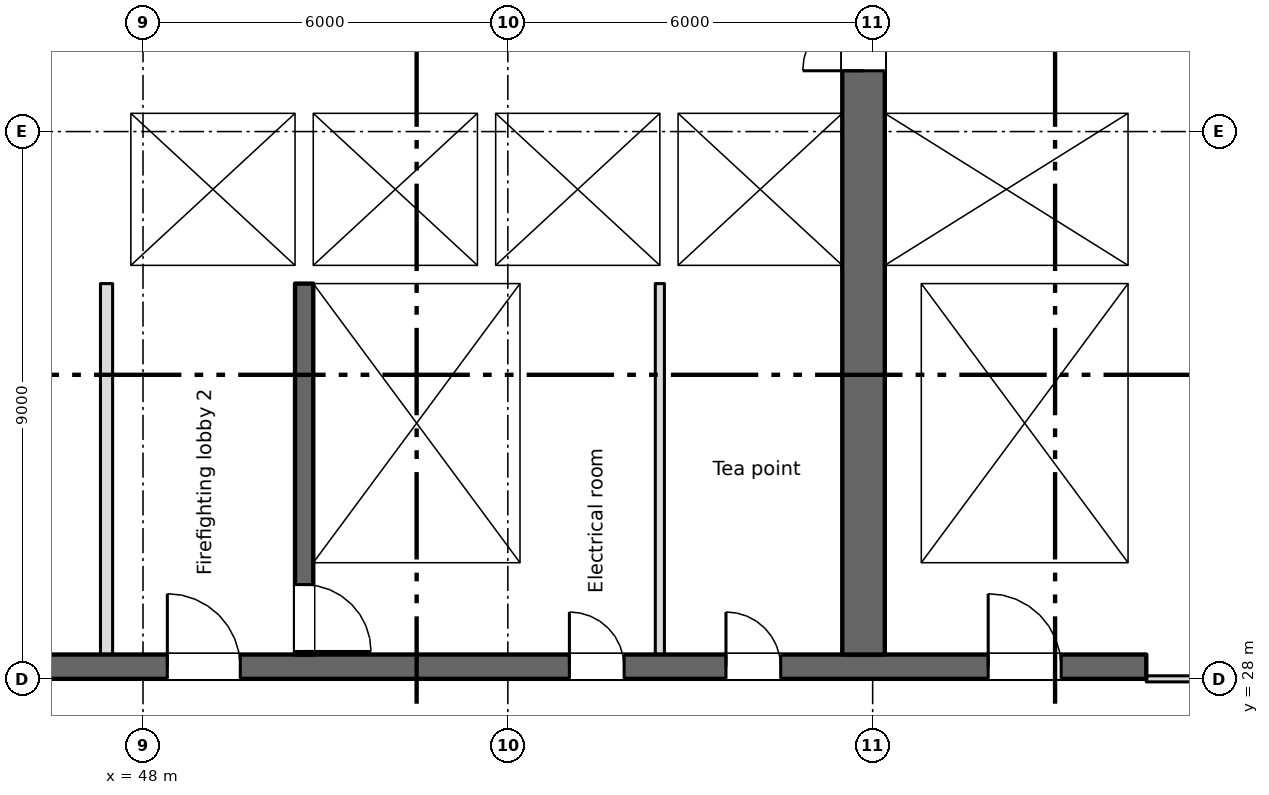
"""IFC4 building model, lengths in metres.
Left out: names, types, materials, properties, quantities, classifications, styles, units other than length and angle.
Written with IfcOpenShell. Run it as: python <this file> out.ifc"""

import sys

from ifc_helpers import new_model, si_unit, direction, frame, frame_2d, origin, place, context, subcontext, project, spatial, rectangle, extrude, element, fill, save


model = new_model("IFC4")
c1 = context("Model", 3, precision=1e-05, world=origin(), true_north=direction((0.0, 1.0)))
c2 = subcontext(c1, "Body", "Model", "MODEL_VIEW")
j1 = project(units=[si_unit("LENGTHUNIT", "METRE"), si_unit("PLANEANGLEUNIT", "RADIAN")], contexts=[c1])
p1 = place(None, origin())
s1 = spatial("IfcSite", under=j1, at=p1, CompositionType="ELEMENT")
p2 = place(p1, origin())
s2 = spatial("IfcBuilding", under=s1, at=p2, CompositionType="ELEMENT")
p3 = place(p2, frame((0.0, 0.0, 189.25)))
s3 = spatial("IfcBuildingStorey", under=s2, at=p3, CompositionType="ELEMENT", Elevation=189.25)
p4 = place(p3, frame((6.6, 28.2, 0.0), z_axis=(0.0, 0.0, 1.0), x_axis=(1.0, 0.0, 0.0)))
e1 = element("IfcWall", 1, at=p4, inside=s3, PredefinedType="SHEAR", context=c2, shape_type="SweptSolid", body=[
    extrude(rectangle(XDim=57.9, YDim=0.4, at=frame_2d((28.95, 0.0))), origin(), (0.0, 0.0, 1.0), 3.35),
])
p5 = place(p4, frame((12.913, 0.0, 0.0)))
e2 = element("IfcOpeningElement", 2, at=p5, cuts=e1, PredefinedType="OPENING", context=c2, shape_type="SweptSolid", body=[
    extrude(rectangle(XDim=0.9, YDim=2.1, at=frame_2d((0.45, 1.05))), frame((0.0, 0.21, 0.0), z_axis=(0.0, -1.0, 0.0), x_axis=(1.0, 0.0, 0.0)), (0.0, 0.0, 1.0), 0.42),
])
p6 = place(p4, frame((15.488, 0.0, 0.0)))
e3 = element("IfcOpeningElement", 3, at=p6, cuts=e1, PredefinedType="OPENING", context=c2, shape_type="SweptSolid", body=[
    extrude(rectangle(XDim=0.9, YDim=2.1, at=frame_2d((0.45, 1.05))), frame((0.0, 0.21, 0.0), z_axis=(0.0, -1.0, 0.0), x_axis=(1.0, 0.0, 0.0)), (0.0, 0.0, 1.0), 0.42),
])
p7 = place(p4, frame((48.413, 0.0, 0.0)))
e4 = element("IfcOpeningElement", 4, at=p7, cuts=e1, PredefinedType="OPENING", context=c2, shape_type="SweptSolid", body=[
    extrude(rectangle(XDim=0.9, YDim=2.1, at=frame_2d((0.45, 1.05))), frame((0.0, 0.21, 0.0), z_axis=(0.0, -1.0, 0.0), x_axis=(1.0, 0.0, 0.0)), (0.0, 0.0, 1.0), 0.42),
])
p8 = place(p4, frame((50.988, 0.0, 0.0)))
e5 = element("IfcOpeningElement", 5, at=p8, cuts=e1, PredefinedType="OPENING", context=c2, shape_type="SweptSolid", body=[
    extrude(rectangle(XDim=0.9, YDim=2.1, at=frame_2d((0.45, 1.05))), frame((0.0, 0.21, 0.0), z_axis=(0.0, -1.0, 0.0), x_axis=(1.0, 0.0, 0.0)), (0.0, 0.0, 1.0), 0.42),
])
p9 = place(p4, frame((0.663, 0.0, 0.0)))
e6 = element("IfcOpeningElement", 6, at=p9, cuts=e1, PredefinedType="OPENING", context=c2, shape_type="SweptSolid", body=[
    extrude(rectangle(XDim=0.9, YDim=2.1, at=frame_2d((0.45, 1.05))), frame((0.0, 0.21, 0.0), z_axis=(0.0, -1.0, 0.0), x_axis=(1.0, 0.0, 0.0)), (0.0, 0.0, 1.0), 0.42),
])
p10 = place(p4, frame((2.238, 0.0, 0.0)))
e7 = element("IfcOpeningElement", 7, at=p10, cuts=e1, PredefinedType="OPENING", context=c2, shape_type="SweptSolid", body=[
    extrude(rectangle(XDim=0.9, YDim=2.1, at=frame_2d((0.45, 1.05))), frame((0.0, 0.21, 0.0), z_axis=(0.0, -1.0, 0.0), x_axis=(1.0, 0.0, 0.0)), (0.0, 0.0, 1.0), 0.42),
])
p11 = place(p4, frame((4.8, 0.0, 0.0)))
e8 = element("IfcOpeningElement", 8, at=p11, cuts=e1, PredefinedType="OPENING", context=c2, shape_type="SweptSolid", body=[
    extrude(rectangle(XDim=1.2, YDim=2.1, at=frame_2d((0.6, 1.05))), frame((0.0, 0.21, 0.0), z_axis=(0.0, -1.0, 0.0), x_axis=(1.0, 0.0, 0.0)), (0.0, 0.0, 1.0), 0.42),
])
p12 = place(p4, frame((31.8, 0.0, 0.0)))
e9 = element("IfcOpeningElement", 9, at=p12, cuts=e1, PredefinedType="OPENING", context=c2, shape_type="SweptSolid", body=[
    extrude(rectangle(XDim=1.2, YDim=2.1, at=frame_2d((0.6, 1.05))), frame((0.0, 0.21, 0.0), z_axis=(0.0, -1.0, 0.0), x_axis=(1.0, 0.0, 0.0)), (0.0, 0.0, 1.0), 0.42),
])
p13 = place(p4, frame((55.3, 0.0, 0.0)))
e10 = element("IfcOpeningElement", 10, at=p13, cuts=e1, PredefinedType="OPENING", context=c2, shape_type="SweptSolid", body=[
    extrude(rectangle(XDim=1.2, YDim=2.1, at=frame_2d((0.6, 1.05))), frame((0.0, 0.21, 0.0), z_axis=(0.0, -1.0, 0.0), x_axis=(1.0, 0.0, 0.0)), (0.0, 0.0, 1.0), 0.42),
])
p14 = place(p4, frame((21.8, 0.0, 0.0)))
e11 = element("IfcOpeningElement", 11, at=p14, cuts=e1, PredefinedType="OPENING", context=c2, shape_type="SweptSolid", body=[
    extrude(rectangle(XDim=1.2, YDim=2.1, at=frame_2d((0.6, 1.05))), frame((0.0, 0.21, 0.0), z_axis=(0.0, -1.0, 0.0), x_axis=(1.0, 0.0, 0.0)), (0.0, 0.0, 1.0), 0.42),
])
p15 = place(p4, frame((41.8, 0.0, 0.0)))
e12 = element("IfcOpeningElement", 12, at=p15, cuts=e1, PredefinedType="OPENING", context=c2, shape_type="SweptSolid", body=[
    extrude(rectangle(XDim=1.2, YDim=2.1, at=frame_2d((0.6, 1.05))), frame((0.0, 0.21, 0.0), z_axis=(0.0, -1.0, 0.0), x_axis=(1.0, 0.0, 0.0)), (0.0, 0.0, 1.0), 0.42),
])
p16 = place(p4, frame((24.95, 0.0, 0.0)))
e13 = element("IfcOpeningElement", 13, at=p16, cuts=e1, PredefinedType="OPENING", context=c2, shape_type="SweptSolid", body=[
    extrude(rectangle(XDim=2.4, YDim=2.1, at=frame_2d((1.2, 1.05))), frame((0.0, 0.21, 0.0), z_axis=(0.0, -1.0, 0.0), x_axis=(1.0, 0.0, 0.0)), (0.0, 0.0, 1.0), 0.42),
])
p17 = place(p4, frame((37.45, 0.0, 0.0)))
e14 = element("IfcOpeningElement", 14, at=p17, cuts=e1, PredefinedType="OPENING", context=c2, shape_type="SweptSolid", body=[
    extrude(rectangle(XDim=2.4, YDim=2.1, at=frame_2d((1.2, 1.05))), frame((0.0, 0.21, 0.0), z_axis=(0.0, -1.0, 0.0), x_axis=(1.0, 0.0, 0.0)), (0.0, 0.0, 1.0), 0.42),
])
p18 = place(p4, frame((8.1, 0.0, 0.0)))
e15 = element("IfcOpeningElement", 15, at=p18, cuts=e1, PredefinedType="OPENING", context=c2, shape_type="SweptSolid", body=[
    extrude(rectangle(XDim=2.4, YDim=2.1, at=frame_2d((1.2, 1.05))), frame((0.0, 0.21, 0.0), z_axis=(0.0, -1.0, 0.0), x_axis=(1.0, 0.0, 0.0)), (0.0, 0.0, 1.0), 0.42),
])
p19 = place(p4, frame((28.95, 0.0, 0.0)))
e16 = element("IfcOpeningElement", 16, at=p19, cuts=e1, PredefinedType="OPENING", context=c2, shape_type="SweptSolid", body=[
    extrude(rectangle(XDim=0.9, YDim=2.1, at=frame_2d((0.45, 1.05))), frame((0.0, 0.21, 0.0), z_axis=(0.0, -1.0, 0.0), x_axis=(1.0, 0.0, 0.0)), (0.0, 0.0, 1.0), 0.42),
])
p20 = place(p4, frame((34.95, 0.0, 0.0)))
e17 = element("IfcOpeningElement", 17, at=p20, cuts=e1, PredefinedType="OPENING", context=c2, shape_type="SweptSolid", body=[
    extrude(rectangle(XDim=0.9, YDim=2.1, at=frame_2d((0.45, 1.05))), frame((0.0, 0.21, 0.0), z_axis=(0.0, -1.0, 0.0), x_axis=(1.0, 0.0, 0.0)), (0.0, 0.0, 1.0), 0.42),
])
p21 = place(p3, frame((64.35, 34.8, 0.0), z_axis=(0.0, 0.0, 1.0), x_axis=(0.0, 1.0, 0.0)))
e18 = element("IfcWall", 18, at=p21, inside=s3, PredefinedType="SHEAR", context=c2, shape_type="SweptSolid", body=[
    extrude(rectangle(XDim=10.5, YDim=0.3, at=frame_2d((5.25, 0.0))), origin(), (0.0, 0.0, 1.0), 3.35),
])
p22 = place(p3, frame((59.85, 28.4, 0.0), z_axis=(0.0, 0.0, 1.0), x_axis=(0.0, 1.0, 0.0)))
e19 = element("IfcWall", 19, at=p22, inside=s3, PredefinedType="SHEAR", context=c2, shape_type="SweptSolid", body=[
    extrude(rectangle(XDim=16.9, YDim=0.7, at=frame_2d((8.45, 0.0))), origin(), (0.0, 0.0, 1.0), 3.35),
])
p23 = place(p22, frame((9.6, 0.0, 0.0)))
e20 = element("IfcOpeningElement", 20, at=p23, cuts=e19, PredefinedType="OPENING", context=c2, shape_type="SweptSolid", body=[
    extrude(rectangle(XDim=2.0, YDim=2.1, at=frame_2d((1.0, 1.05))), frame((0.0, 0.36, 0.0), z_axis=(0.0, -1.0, 0.0), x_axis=(1.0, 0.0, 0.0)), (0.0, 0.0, 1.0), 0.72),
])
p24 = place(p22, frame((15.4, 0.0, 0.0)))
e21 = element("IfcOpeningElement", 21, at=p24, cuts=e19, PredefinedType="OPENING", context=c2, shape_type="SweptSolid", body=[
    extrude(rectangle(XDim=1.2, YDim=2.1, at=frame_2d((0.6, 1.05))), frame((0.0, 0.36, 0.0), z_axis=(0.0, -1.0, 0.0), x_axis=(1.0, 0.0, 0.0)), (0.0, 0.0, 1.0), 0.72),
])
p25 = place(p3, frame((50.65, 34.5, 0.0), z_axis=(0.0, 0.0, 1.0), x_axis=(0.0, -1.0, 0.0)))
e22 = element("IfcWall", 22, at=p25, inside=s3, PredefinedType="SHEAR", context=c2, shape_type="SweptSolid", body=[
    extrude(rectangle(XDim=6.1, YDim=0.3, at=frame_2d((3.05, 0.0))), origin(), (0.0, 0.0, 1.0), 3.35),
])
p26 = place(p25, frame((4.95, 0.0, 0.0)))
e23 = element("IfcOpeningElement", 23, at=p26, cuts=e22, PredefinedType="OPENING", context=c2, shape_type="SweptSolid", body=[
    extrude(rectangle(XDim=1.1, YDim=2.1, at=frame_2d((0.55, 1.05))), frame((0.0, 0.16, 0.0), z_axis=(0.0, -1.0, 0.0), x_axis=(1.0, 0.0, 0.0)), (0.0, 0.0, 1.0), 0.32),
])
p27 = place(p3, frame((54.35, 28.4, 0.0), z_axis=(0.0, 0.0, 1.0), x_axis=(0.0, 1.0, 0.0)))
e24 = element("IfcWall", 24, at=p27, inside=s3, PredefinedType="SHEAR", context=c2, shape_type="SweptSolid", body=[
    extrude(rectangle(XDim=6.1, YDim=0.3, at=frame_2d((3.05, 0.0))), origin(), (0.0, 0.0, 1.0), 3.35),
])
p28 = place(p3, frame((60.5, 28.4, 0.0), z_axis=(0.0, 0.0, 1.0), x_axis=(0.0, 1.0, 0.0)))
e25 = element("IfcWall", 25, at=p28, inside=s3, PredefinedType="SHEAR", context=c2, shape_type="SweptSolid", body=[
    extrude(rectangle(XDim=6.1, YDim=0.6, at=frame_2d((3.05, 0.0))), origin(), (0.0, 0.0, 1.0), 3.35),
])
p29 = place(p3, frame((64.35, 28.4, 0.0), z_axis=(0.0, 0.0, 1.0), x_axis=(0.0, 1.0, 0.0)))
e26 = element("IfcWall", 26, at=p29, inside=s3, PredefinedType="SHEAR", context=c2, shape_type="SweptSolid", body=[
    extrude(rectangle(XDim=6.1, YDim=0.3, at=frame_2d((3.05, 0.0))), origin(), (0.0, 0.0, 1.0), 3.35),
])
p30 = place(p3, frame((47.3, 34.65, 0.0), z_axis=(0.0, 0.0, 1.0), x_axis=(1.0, 0.0, 0.0)))
e27 = element("IfcWall", 27, at=p30, inside=s3, PredefinedType="SHEAR", context=c2, shape_type="SweptSolid", body=[
    extrude(rectangle(XDim=12.2, YDim=0.3, at=frame_2d((6.1, 0.0))), origin(), (0.0, 0.0, 1.0), 3.35),
])
p31 = place(p30, frame((1.3, 0.0, 0.0)))
e28 = element("IfcOpeningElement", 28, at=p31, cuts=e27, PredefinedType="OPENING", context=c2, shape_type="SweptSolid", body=[
    extrude(rectangle(XDim=1.1, YDim=2.1, at=frame_2d((0.55, 1.05))), frame((0.0, 0.16, 0.0), z_axis=(0.0, -1.0, 0.0), x_axis=(1.0, 0.0, 0.0)), (0.0, 0.0, 1.0), 0.32),
])
p32 = place(p3, frame((60.2, 34.65, 0.0), z_axis=(0.0, 0.0, 1.0), x_axis=(1.0, 0.0, 0.0)))
e29 = element("IfcWall", 29, at=p32, inside=s3, PredefinedType="SHEAR", context=c2, shape_type="SweptSolid", body=[
    extrude(rectangle(XDim=4.3, YDim=0.3, at=frame_2d((2.15, 0.0))), origin(), (0.0, 0.0, 1.0), 3.35),
])
p33 = place(p3, frame((47.3, 37.45, 0.0), z_axis=(0.0, 0.0, 1.0), x_axis=(1.0, 0.0, 0.0)))
e30 = element("IfcWall", 30, at=p33, inside=s3, PredefinedType="SHEAR", context=c2, shape_type="SweptSolid", body=[
    extrude(rectangle(XDim=12.2, YDim=0.3, at=frame_2d((6.1, 0.0))), origin(), (0.0, 0.0, 1.0), 3.35),
])
p34 = place(p33, frame((4.3, 0.0, 0.0)))
e31 = element("IfcOpeningElement", 31, at=p34, cuts=e30, PredefinedType="OPENING", context=c2, shape_type="SweptSolid", body=[
    extrude(rectangle(XDim=1.1, YDim=2.1, at=frame_2d((0.55, 1.05))), frame((0.0, 0.16, 0.0), z_axis=(0.0, -1.0, 0.0), x_axis=(1.0, 0.0, 0.0)), (0.0, 0.0, 1.0), 0.32),
])
p35 = place(p33, frame((7.3, 0.0, 0.0)))
e32 = element("IfcOpeningElement", 32, at=p35, cuts=e30, PredefinedType="OPENING", context=c2, shape_type="SweptSolid", body=[
    extrude(rectangle(XDim=1.1, YDim=2.1, at=frame_2d((0.55, 1.05))), frame((0.0, 0.16, 0.0), z_axis=(0.0, -1.0, 0.0), x_axis=(1.0, 0.0, 0.0)), (0.0, 0.0, 1.0), 0.32),
])
p36 = place(p33, frame((10.3, 0.0, 0.0)))
e33 = element("IfcOpeningElement", 33, at=p36, cuts=e30, PredefinedType="OPENING", context=c2, shape_type="SweptSolid", body=[
    extrude(rectangle(XDim=1.1, YDim=2.1, at=frame_2d((0.55, 1.05))), frame((0.0, 0.16, 0.0), z_axis=(0.0, -1.0, 0.0), x_axis=(1.0, 0.0, 0.0)), (0.0, 0.0, 1.0), 0.32),
])
p37 = place(p3, frame((60.2, 37.45, 0.0), z_axis=(0.0, 0.0, 1.0), x_axis=(1.0, 0.0, 0.0)))
e34 = element("IfcWall", 34, at=p37, inside=s3, PredefinedType="SHEAR", context=c2, shape_type="SweptSolid", body=[
    extrude(rectangle(XDim=4.0, YDim=0.3, at=frame_2d((2.0, 0.0))), origin(), (0.0, 0.0, 1.0), 3.35),
])
p38 = place(p37, frame((1.45, 0.0, 0.0)))
e35 = element("IfcOpeningElement", 35, at=p38, cuts=e34, PredefinedType="OPENING", context=c2, shape_type="SweptSolid", body=[
    extrude(rectangle(XDim=1.1, YDim=2.1, at=frame_2d((0.55, 1.05))), frame((0.0, 0.16, 0.0), z_axis=(0.0, -1.0, 0.0), x_axis=(1.0, 0.0, 0.0)), (0.0, 0.0, 1.0), 0.32),
])
p39 = place(p3, frame((47.55, 34.8, 0.0), z_axis=(0.0, 0.0, 1.0), x_axis=(0.0, 1.0, 0.0)))
e36 = element("IfcWall", 36, at=p39, inside=s3, PredefinedType="SHEAR", context=c2, shape_type="SweptSolid", body=[
    extrude(rectangle(XDim=2.5, YDim=0.5, at=frame_2d((1.25, 0.0))), origin(), (0.0, 0.0, 1.0), 3.35),
])
for number, where, z_axis, x_axis in (
    (37, (50.65, 34.8, 0.0), (0.0, 0.0, 1.0), (0.0, 1.0, 0.0)),
    (38, (53.65, 34.8, 0.0), (0.0, 0.0, 1.0), (0.0, 1.0, 0.0)),
    (39, (56.65, 34.8, 0.0), (0.0, 0.0, 1.0), (0.0, 1.0, 0.0)),
):
    element("IfcWall", number, at=place(p3, frame(where, z_axis=z_axis, x_axis=x_axis)), inside=s3, PredefinedType="SHEAR", context=c2, shape_type="SweptSolid", body=[
        extrude(rectangle(XDim=2.5, YDim=0.3, at=frame_2d((1.25, 0.0))), origin(), (0.0, 0.0, 1.0), 3.35),
    ])
p40 = place(p3, frame((47.4, 28.4, 0.0), z_axis=(0.0, 0.0, 1.0), x_axis=(0.0, 1.0, 0.0)))
e40 = element("IfcWall", 40, at=p40, inside=s3, PredefinedType="PARTITIONING", context=c2, shape_type="SweptSolid", body=[
    extrude(rectangle(XDim=6.1, YDim=0.2, at=frame_2d((3.05, 0.0))), origin(), (0.0, 0.0, 1.0), 3.35),
])
p41 = place(p3, frame((56.5, 28.4, 0.0), z_axis=(0.0, 0.0, 1.0), x_axis=(0.0, 1.0, 0.0)))
e41 = element("IfcWall", 41, at=p41, inside=s3, PredefinedType="PARTITIONING", context=c2, shape_type="SweptSolid", body=[
    extrude(rectangle(XDim=6.1, YDim=0.15, at=frame_2d((3.05, 0.0))), origin(), (0.0, 0.0, 1.0), 3.35),
])
p42 = place(p3, frame((64.5, 28.0, 0.0), z_axis=(0.0, 0.0, 1.0), x_axis=(1.0, 0.0, 0.0)))
e42 = element("IfcWall", 42, at=p42, inside=s3, PredefinedType="PARTITIONING", context=c2, shape_type="SweptSolid", body=[
    extrude(rectangle(XDim=6.9, YDim=0.1, at=frame_2d((3.45, 0.0))), origin(), (0.0, 0.0, 1.0), 3.35),
])
p43 = place(p42, frame((2.55, 0.0, 0.0)))
e43 = element("IfcOpeningElement", 43, at=p43, cuts=e42, PredefinedType="OPENING", context=c2, shape_type="SweptSolid", body=[
    extrude(rectangle(XDim=1.8, YDim=2.1, at=frame_2d((0.9, 1.05))), frame((0.0, 0.06, 0.0), z_axis=(0.0, -1.0, 0.0), x_axis=(1.0, 0.0, 0.0)), (0.0, 0.0, 1.0), 0.12),
])
p44 = place(p7, origin())
e44 = element("IfcDoor", 44, at=p44, inside=s3, OperationType="SINGLE_SWING_LEFT", PredefinedType="DOOR", context=c2, shape_type="SweptSolid", body=[
    extrude(rectangle(XDim=0.9, YDim=2.1, at=frame_2d((0.45, 1.05))), frame((0.0, 0.025, 0.0), z_axis=(0.0, -1.0, 0.0), x_axis=(1.0, 0.0, 0.0)), (0.0, 0.0, 1.0), 0.05),
])
fill(e4, e44)
p45 = place(p8, origin())
e45 = element("IfcDoor", 45, at=p45, inside=s3, OperationType="SINGLE_SWING_LEFT", PredefinedType="DOOR", context=c2, shape_type="SweptSolid", body=[
    extrude(rectangle(XDim=0.9, YDim=2.1, at=frame_2d((0.45, 1.05))), frame((0.0, 0.025, 0.0), z_axis=(0.0, -1.0, 0.0), x_axis=(1.0, 0.0, 0.0)), (0.0, 0.0, 1.0), 0.05),
])
fill(e5, e45)
p46 = place(p34, origin())
e46 = element("IfcDoor", 46, at=p46, inside=s3, OperationType="SLIDING_TO_LEFT", PredefinedType="DOOR", context=c2, shape_type="SweptSolid", body=[
    extrude(rectangle(XDim=1.1, YDim=2.1, at=frame_2d((0.55, 1.05))), frame((0.0, 0.025, 0.0), z_axis=(0.0, -1.0, 0.0), x_axis=(1.0, 0.0, 0.0)), (0.0, 0.0, 1.0), 0.05),
])
fill(e31, e46)
p47 = place(p35, origin())
e47 = element("IfcDoor", 47, at=p47, inside=s3, OperationType="SLIDING_TO_LEFT", PredefinedType="DOOR", context=c2, shape_type="SweptSolid", body=[
    extrude(rectangle(XDim=1.1, YDim=2.1, at=frame_2d((0.55, 1.05))), frame((0.0, 0.025, 0.0), z_axis=(0.0, -1.0, 0.0), x_axis=(1.0, 0.0, 0.0)), (0.0, 0.0, 1.0), 0.05),
])
fill(e32, e47)
p48 = place(p36, origin())
e48 = element("IfcDoor", 48, at=p48, inside=s3, OperationType="SLIDING_TO_LEFT", PredefinedType="DOOR", context=c2, shape_type="SweptSolid", body=[
    extrude(rectangle(XDim=1.1, YDim=2.1, at=frame_2d((0.55, 1.05))), frame((0.0, 0.025, 0.0), z_axis=(0.0, -1.0, 0.0), x_axis=(1.0, 0.0, 0.0)), (0.0, 0.0, 1.0), 0.05),
])
fill(e33, e48)
p49 = place(p38, origin())
e49 = element("IfcDoor", 49, at=p49, inside=s3, OperationType="SLIDING_TO_LEFT", PredefinedType="DOOR", context=c2, shape_type="SweptSolid", body=[
    extrude(rectangle(XDim=1.1, YDim=2.1, at=frame_2d((0.55, 1.05))), frame((0.0, 0.025, 0.0), z_axis=(0.0, -1.0, 0.0), x_axis=(1.0, 0.0, 0.0)), (0.0, 0.0, 1.0), 0.05),
])
fill(e35, e49)
p50 = place(p31, origin())
e50 = element("IfcDoor", 50, at=p50, inside=s3, OperationType="SLIDING_TO_LEFT", PredefinedType="DOOR", context=c2, shape_type="SweptSolid", body=[
    extrude(rectangle(XDim=1.1, YDim=2.1, at=frame_2d((0.55, 1.05))), frame((0.0, 0.025, 0.0), z_axis=(0.0, -1.0, 0.0), x_axis=(1.0, 0.0, 0.0)), (0.0, 0.0, 1.0), 0.05),
])
fill(e28, e50)
p51 = place(p26, origin())
e51 = element("IfcDoor", 51, at=p51, inside=s3, OperationType="SINGLE_SWING_RIGHT", PredefinedType="DOOR", context=c2, shape_type="SweptSolid", body=[
    extrude(rectangle(XDim=1.1, YDim=2.1, at=frame_2d((0.55, 1.05))), frame((0.0, 0.025, 0.0), z_axis=(0.0, -1.0, 0.0), x_axis=(1.0, 0.0, 0.0)), (0.0, 0.0, 1.0), 0.05),
])
fill(e23, e51)
p52 = place(p13, origin())
e52 = element("IfcDoor", 52, at=p52, inside=s3, OperationType="SINGLE_SWING_LEFT", PredefinedType="DOOR", context=c2, shape_type="SweptSolid", body=[
    extrude(rectangle(XDim=1.2, YDim=2.1, at=frame_2d((0.6, 1.05))), frame((0.0, 0.025, 0.0), z_axis=(0.0, -1.0, 0.0), x_axis=(1.0, 0.0, 0.0)), (0.0, 0.0, 1.0), 0.05),
])
fill(e10, e52)
p53 = place(p15, origin())
e53 = element("IfcDoor", 53, at=p53, inside=s3, OperationType="SINGLE_SWING_LEFT", PredefinedType="DOOR", context=c2, shape_type="SweptSolid", body=[
    extrude(rectangle(XDim=1.2, YDim=2.1, at=frame_2d((0.6, 1.05))), frame((0.0, 0.025, 0.0), z_axis=(0.0, -1.0, 0.0), x_axis=(1.0, 0.0, 0.0)), (0.0, 0.0, 1.0), 0.05),
])
fill(e12, e53)
p54 = place(p23, origin())
e54 = element("IfcDoor", 54, at=p54, inside=s3, OperationType="DOUBLE_DOOR_SINGLE_SWING", PredefinedType="DOOR", context=c2, shape_type="SweptSolid", body=[
    extrude(rectangle(XDim=2.0, YDim=2.1, at=frame_2d((1.0, 1.05))), frame((0.0, 0.025, 0.0), z_axis=(0.0, -1.0, 0.0), x_axis=(1.0, 0.0, 0.0)), (0.0, 0.0, 1.0), 0.05),
])
fill(e20, e54)
save(model, sys.argv[1])
